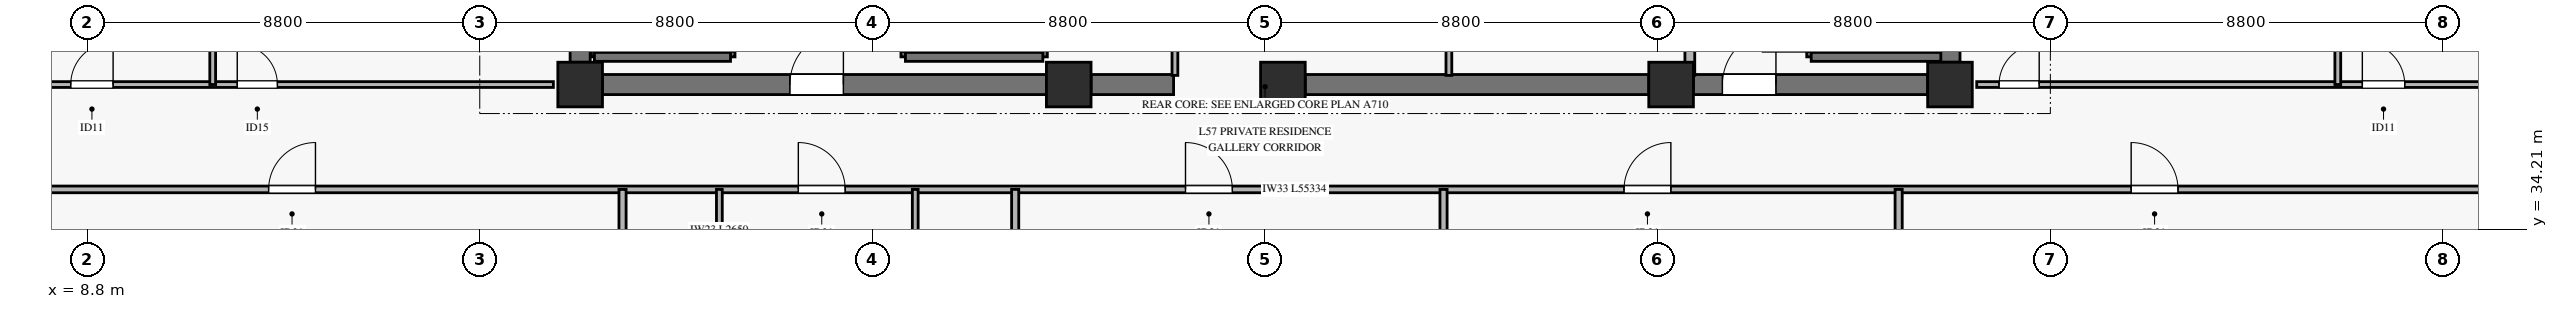
"""IFC4 building model, lengths in metres.
Left out: names, types, materials, properties, quantities, classifications, styles, units other than length and angle.
Written with IfcOpenShell. Run it as: python <this file> out.ifc"""

import sys

from ifc_helpers import new_model, si_unit, direction, frame, frame_2d, origin, origin_2d, place, context, subcontext, project, spatial, rectangle, extrude, source, transform, mapped, element, fill, save


model = new_model("IFC4")
c1 = context("Model", 3, precision=1e-05, world=origin(), true_north=direction((0.0, 1.0)))
c2 = subcontext(c1, "Body", "Model", "MODEL_VIEW")
j1 = project(units=[si_unit("LENGTHUNIT", "METRE"), si_unit("PLANEANGLEUNIT", "RADIAN")], contexts=[c1])
p1 = place(None, origin())
s1 = spatial("IfcSite", under=j1, at=p1, CompositionType="ELEMENT")
p2 = place(p1, origin())
s2 = spatial("IfcBuilding", under=s1, at=p2, CompositionType="ELEMENT")
p3 = place(p2, frame((0.0, 0.0, 227.0)))
s3 = spatial("IfcBuildingStorey", under=s2, at=p3, CompositionType="ELEMENT", Elevation=227.0)
m1 = source(origin(), c2, "Body", "SweptSolid", [
    extrude(rectangle(XDim=1.0, YDim=1.0, at=origin_2d()), origin(), (0.0, 0.0, 1.0), 3.185),
])
for number, where, z_axis, x_axis in (
    (1, (19.85, 37.45, 0.0), (0.0, 0.0, 1.0), (1.0, 0.0, 0.0)),
    (2, (30.8, 37.45, 0.0), (0.0, 0.0, 1.0), (1.0, 0.0, 0.0)),
    (3, (35.6, 37.45, 0.0), (0.0, 0.0, 1.0), (1.0, 0.0, 0.0)),
    (4, (44.3, 37.45, 0.0), (0.0, 0.0, 1.0), (1.0, 0.0, 0.0)),
    (5, (50.55, 37.45, 0.0), (0.0, 0.0, 1.0), (1.0, 0.0, 0.0)),
):
    element("IfcColumn", number, at=place(p3, frame(where, z_axis=z_axis, x_axis=x_axis)), inside=s3, PredefinedType="PILASTER", context=c2, shape_type="MappedRepresentation", body=[
        mapped(m1, transform((0.0, 0.0, 0.0), x_axis=(1.0, 0.0, 0.0), y_axis=(0.0, 1.0, 0.0), z_axis=(0.0, 0.0, 1.0), scale=1.0)),
    ])
p4 = place(p3, frame((20.35, 37.45, 0.0), z_axis=(0.0, 0.0, 1.0), x_axis=(1.0, 0.0, 0.0)))
e6 = element("IfcWall", 6, at=p4, inside=s3, PredefinedType="SHEAR", context=c2, shape_type="SweptSolid", body=[
    extrude(rectangle(XDim=9.95, YDim=0.45, at=frame_2d((4.975, 0.0))), origin(), (0.0, 0.0, 1.0), 3.185),
])
p5 = place(p4, frame((4.2, 0.0, 0.0)))
e7 = element("IfcOpeningElement", 7, at=p5, cuts=e6, PredefinedType="OPENING", context=c2, shape_type="SweptSolid", body=[
    extrude(rectangle(XDim=1.2, YDim=2.15, at=frame_2d((0.6, 1.075))), frame((0.0, 0.235, 0.0), z_axis=(0.0, -1.0, 0.0), x_axis=(1.0, 0.0, 0.0)), (0.0, 0.0, 1.0), 0.47),
])
p6 = place(p3, frame((31.3, 37.45, 0.0), z_axis=(0.0, 0.0, 1.0), x_axis=(1.0, 0.0, 0.0)))
e8 = element("IfcWall", 8, at=p6, inside=s3, PredefinedType="SHEAR", context=c2, shape_type="SweptSolid", body=[
    extrude(rectangle(XDim=1.85, YDim=0.45, at=frame_2d((0.925, 0.0))), origin(), (0.0, 0.0, 1.0), 3.185),
])
p7 = place(p3, frame((36.1, 37.45, 0.0), z_axis=(0.0, 0.0, 1.0), x_axis=(1.0, 0.0, 0.0)))
e9 = element("IfcWall", 9, at=p7, inside=s3, PredefinedType="SHEAR", context=c2, shape_type="SweptSolid", body=[
    extrude(rectangle(XDim=7.7, YDim=0.45, at=frame_2d((3.85, 0.0))), origin(), (0.0, 0.0, 1.0), 3.185),
])
p8 = place(p3, frame((44.8, 37.45, 0.0), z_axis=(0.0, 0.0, 1.0), x_axis=(1.0, 0.0, 0.0)))
e10 = element("IfcWall", 10, at=p8, inside=s3, PredefinedType="SHEAR", context=c2, shape_type="SweptSolid", body=[
    extrude(rectangle(XDim=5.25, YDim=0.45, at=frame_2d((2.625, 0.0))), origin(), (0.0, 0.0, 1.0), 3.185),
])
p9 = place(p8, frame((0.65, 0.0, 0.0)))
e11 = element("IfcOpeningElement", 11, at=p9, cuts=e10, PredefinedType="OPENING", context=c2, shape_type="SweptSolid", body=[
    extrude(rectangle(XDim=1.2, YDim=2.15, at=frame_2d((0.6, 1.075))), frame((0.0, 0.235, 0.0), z_axis=(0.0, -1.0, 0.0), x_axis=(1.0, 0.0, 0.0)), (0.0, 0.0, 1.0), 0.47),
])
for number, where, z_axis, x_axis in (
    (12, (19.85, 37.95, 0.0), (0.0, 0.0, 1.0), (0.0, 1.0, 0.0)),
    (13, (50.55, 37.95, 0.0), (0.0, 0.0, 1.0), (0.0, 1.0, 0.0)),
):
    element("IfcWall", number, at=place(p3, frame(where, z_axis=z_axis, x_axis=x_axis)), inside=s3, PredefinedType="SHEAR", context=c2, shape_type="SweptSolid", body=[
        extrude(rectangle(XDim=8.1, YDim=0.45, at=frame_2d((4.05, 0.0))), origin(), (0.0, 0.0, 1.0), 3.185),
    ])
p10 = place(p3, frame((20.17, 38.07, 0.0), z_axis=(0.0, 0.0, 1.0), x_axis=(0.0, 1.0, 0.0)))
e14 = element("IfcWall", 14, at=p10, inside=s3, PredefinedType="SOLIDWALL", context=c2, shape_type="SweptSolid", body=[
    extrude(rectangle(XDim=7.25, YDim=0.14, at=frame_2d((3.625, 0.0))), origin(), (0.0, 0.0, 1.0), 3.4),
])
p11 = place(p3, frame((23.22, 38.07, 0.0), z_axis=(0.0, 0.0, 1.0), x_axis=(0.0, 1.0, 0.0)))
e15 = element("IfcWall", 15, at=p11, inside=s3, PredefinedType="SOLIDWALL", context=c2, shape_type="SweptSolid", body=[
    extrude(rectangle(XDim=7.25, YDim=0.2, at=frame_2d((3.625, 0.0))), origin(), (0.0, 0.0, 1.0), 3.4),
])
p12 = place(p11, frame((0.11, 0.0, 0.0)))
e16 = element("IfcOpeningElement", 16, at=p12, cuts=e15, PredefinedType="OPENING", context=c2, shape_type="SweptSolid", body=[
    extrude(rectangle(XDim=1.1, YDim=2.15, at=frame_2d((0.55, 1.075))), frame((0.0, 0.11, 0.0), z_axis=(0.0, -1.0, 0.0), x_axis=(1.0, 0.0, 0.0)), (0.0, 0.0, 1.0), 0.22),
])
p13 = place(p3, frame((20.17, 38.07, 0.0), z_axis=(0.0, 0.0, 1.0), x_axis=(1.0, 0.0, 0.0)))
e17 = element("IfcWall", 17, at=p13, inside=s3, PredefinedType="SOLIDWALL", context=c2, shape_type="SweptSolid", body=[
    extrude(rectangle(XDim=3.05, YDim=0.2, at=frame_2d((1.525, 0.0))), origin(), (0.0, 0.0, 1.0), 3.4),
])
p14 = place(p3, frame((27.14, 38.07, 0.0), z_axis=(0.0, 0.0, 1.0), x_axis=(0.0, 1.0, 0.0)))
e18 = element("IfcWall", 18, at=p14, inside=s3, PredefinedType="SOLIDWALL", context=c2, shape_type="SweptSolid", body=[
    extrude(rectangle(XDim=7.25, YDim=0.2, at=frame_2d((3.625, 0.0))), origin(), (0.0, 0.0, 1.0), 3.4),
])
p15 = place(p14, frame((0.11, 0.0, 0.0)))
e19 = element("IfcOpeningElement", 19, at=p15, cuts=e18, PredefinedType="OPENING", context=c2, shape_type="SweptSolid", body=[
    extrude(rectangle(XDim=1.1, YDim=2.15, at=frame_2d((0.55, 1.075))), frame((0.0, 0.11, 0.0), z_axis=(0.0, -1.0, 0.0), x_axis=(1.0, 0.0, 0.0)), (0.0, 0.0, 1.0), 0.22),
])
p16 = place(p3, frame((30.22, 38.07, 0.0), z_axis=(0.0, 0.0, 1.0), x_axis=(0.0, 1.0, 0.0)))
e20 = element("IfcWall", 20, at=p16, inside=s3, PredefinedType="SOLIDWALL", context=c2, shape_type="SweptSolid", body=[
    extrude(rectangle(XDim=7.25, YDim=0.2, at=frame_2d((3.625, 0.0))), origin(), (0.0, 0.0, 1.0), 3.4),
])
p17 = place(p3, frame((27.14, 38.07, 0.0), z_axis=(0.0, 0.0, 1.0), x_axis=(1.0, 0.0, 0.0)))
e21 = element("IfcWall", 21, at=p17, inside=s3, PredefinedType="SOLIDWALL", context=c2, shape_type="SweptSolid", body=[
    extrude(rectangle(XDim=3.08, YDim=0.2, at=frame_2d((1.54, 0.0))), origin(), (0.0, 0.0, 1.0), 3.4),
])
p18 = place(p3, frame((47.44, 38.07, 0.0), z_axis=(0.0, 0.0, 1.0), x_axis=(0.0, 1.0, 0.0)))
e22 = element("IfcWall", 22, at=p18, inside=s3, PredefinedType="SOLIDWALL", context=c2, shape_type="SweptSolid", body=[
    extrude(rectangle(XDim=7.25, YDim=0.2, at=frame_2d((3.625, 0.0))), origin(), (0.0, 0.0, 1.0), 3.4),
])
p19 = place(p18, frame((0.11, 0.0, 0.0)))
e23 = element("IfcOpeningElement", 23, at=p19, cuts=e22, PredefinedType="OPENING", context=c2, shape_type="SweptSolid", body=[
    extrude(rectangle(XDim=1.1, YDim=2.15, at=frame_2d((0.55, 1.075))), frame((0.0, 0.11, 0.0), z_axis=(0.0, -1.0, 0.0), x_axis=(1.0, 0.0, 0.0)), (0.0, 0.0, 1.0), 0.22),
])
p20 = place(p3, frame((47.44, 38.07, 0.0), z_axis=(0.0, 0.0, 1.0), x_axis=(1.0, 0.0, 0.0)))
e24 = element("IfcWall", 24, at=p20, inside=s3, PredefinedType="SOLIDWALL", context=c2, shape_type="SweptSolid", body=[
    extrude(rectangle(XDim=2.905, YDim=0.2, at=frame_2d((1.453, 0.0))), origin(), (0.0, 0.0, 1.0), 3.4),
])
p21 = place(p3, frame((44.72, 37.655, 0.0), z_axis=(0.0, 0.0, 1.0), x_axis=(0.0, 1.0, 0.0)))
e25 = element("IfcWall", 25, at=p21, inside=s3, PredefinedType="SOLIDWALL", context=c2, shape_type="SweptSolid", body=[
    extrude(rectangle(XDim=7.565, YDim=0.22, at=frame_2d((3.782, 0.0))), origin(), (0.0, 0.0, 1.0), 3.185),
])
p22 = place(p3, frame((33.18, 37.655, 0.0), z_axis=(0.0, 0.0, 1.0), x_axis=(0.0, 1.0, 0.0)))
e26 = element("IfcWall", 26, at=p22, inside=s3, PredefinedType="PARTITIONING", context=c2, shape_type="SweptSolid", body=[
    extrude(rectangle(XDim=6.495, YDim=0.13, at=frame_2d((3.248, 0.0))), origin(), (0.0, 0.0, 1.0), 2.27),
])
p23 = place(p22, frame((2.245, 0.0, 0.0)))
e27 = element("IfcOpeningElement", 27, at=p23, cuts=e26, PredefinedType="OPENING", context=c2, shape_type="SweptSolid", body=[
    extrude(rectangle(XDim=0.9, YDim=2.1, at=frame_2d((0.45, 1.05))), frame((0.0, 0.075, 0.0), z_axis=(0.0, -1.0, 0.0), x_axis=(1.0, 0.0, 0.0)), (0.0, 0.0, 1.0), 0.15),
])
p24 = place(p3, frame((39.32, 37.655, 0.0), z_axis=(0.0, 0.0, 1.0), x_axis=(0.0, 1.0, 0.0)))
e28 = element("IfcWall", 28, at=p24, inside=s3, PredefinedType="PARTITIONING", context=c2, shape_type="SweptSolid", body=[
    extrude(rectangle(XDim=8.69, YDim=0.13, at=frame_2d((4.345, 0.0))), origin(), (0.0, 0.0, 1.0), 3.185),
])
p25 = place(p24, frame((4.865, 0.0, 0.0)))
e29 = element("IfcOpeningElement", 29, at=p25, cuts=e28, PredefinedType="OPENING", context=c2, shape_type="SweptSolid", body=[
    extrude(rectangle(XDim=0.9, YDim=2.1, at=frame_2d((0.45, 1.05))), frame((0.0, 0.075, 0.0), z_axis=(0.0, -1.0, 0.0), x_axis=(1.0, 0.0, 0.0)), (0.0, 0.0, 1.0), 0.15),
])
p26 = place(p3, frame((7.533, 35.1, 0.0), z_axis=(0.0, 0.0, 1.0), x_axis=(1.0, 0.0, 0.0)))
e30 = element("IfcWall", 30, at=p26, inside=s3, PredefinedType="PARTITIONING", context=c2, shape_type="SweptSolid", body=[
    extrude(rectangle(XDim=55.334, YDim=0.15, at=frame_2d((27.667, 0.0))), origin(), (0.0, 0.0, 1.0), 2.37),
])
p27 = place(p26, frame((5.335, 0.0, 0.0)))
e31 = element("IfcOpeningElement", 31, at=p27, cuts=e30, PredefinedType="OPENING", context=c2, shape_type="SweptSolid", body=[
    extrude(rectangle(XDim=1.05, YDim=2.15, at=frame_2d((0.525, 1.075))), frame((0.0, 0.085, 0.0), z_axis=(0.0, -1.0, 0.0), x_axis=(1.0, 0.0, 0.0)), (0.0, 0.0, 1.0), 0.17),
])
p28 = place(p26, frame((17.207, 0.0, 0.0)))
e32 = element("IfcOpeningElement", 32, at=p28, cuts=e30, PredefinedType="OPENING", context=c2, shape_type="SweptSolid", body=[
    extrude(rectangle(XDim=1.05, YDim=2.15, at=frame_2d((0.525, 1.075))), frame((0.0, 0.085, 0.0), z_axis=(0.0, -1.0, 0.0), x_axis=(1.0, 0.0, 0.0)), (0.0, 0.0, 1.0), 0.17),
])
p29 = place(p26, frame((25.884, 0.0, 0.0)))
e33 = element("IfcOpeningElement", 33, at=p29, cuts=e30, PredefinedType="OPENING", context=c2, shape_type="SweptSolid", body=[
    extrude(rectangle(XDim=1.05, YDim=2.15, at=frame_2d((0.525, 1.075))), frame((0.0, 0.085, 0.0), z_axis=(0.0, -1.0, 0.0), x_axis=(1.0, 0.0, 0.0)), (0.0, 0.0, 1.0), 0.17),
])
p30 = place(p26, frame((35.712, 0.0, 0.0)))
e34 = element("IfcOpeningElement", 34, at=p30, cuts=e30, PredefinedType="OPENING", context=c2, shape_type="SweptSolid", body=[
    extrude(rectangle(XDim=1.05, YDim=2.15, at=frame_2d((0.525, 1.075))), frame((0.0, 0.085, 0.0), z_axis=(0.0, -1.0, 0.0), x_axis=(1.0, 0.0, 0.0)), (0.0, 0.0, 1.0), 0.17),
])
p31 = place(p26, frame((47.078, 0.0, 0.0)))
e35 = element("IfcOpeningElement", 35, at=p31, cuts=e30, PredefinedType="OPENING", context=c2, shape_type="SweptSolid", body=[
    extrude(rectangle(XDim=1.05, YDim=2.15, at=frame_2d((0.525, 1.075))), frame((0.0, 0.085, 0.0), z_axis=(0.0, -1.0, 0.0), x_axis=(1.0, 0.0, 0.0)), (0.0, 0.0, 1.0), 0.17),
])
for number, where, z_axis, x_axis in (
    (36, (20.8, 13.25, 0.0), (0.0, 0.0, 1.0), (0.0, 1.0, 0.0)),
    (37, (29.6, 13.25, 0.0), (0.0, 0.0, 1.0), (0.0, 1.0, 0.0)),
    (38, (39.2, 13.25, 0.0), (0.0, 0.0, 1.0), (0.0, 1.0, 0.0)),
    (39, (49.4, 13.25, 0.0), (0.0, 0.0, 1.0), (0.0, 1.0, 0.0)),
):
    element("IfcWall", number, at=place(p3, frame(where, z_axis=z_axis, x_axis=x_axis)), inside=s3, PredefinedType="PARTITIONING", context=c2, shape_type="SweptSolid", body=[
        extrude(rectangle(XDim=21.85, YDim=0.16, at=frame_2d((10.925, 0.0))), origin(), (0.0, 0.0, 1.0), 2.77),
    ])
p32 = place(p3, frame((22.97, 32.45, 0.0), z_axis=(0.0, 0.0, 1.0), x_axis=(0.0, 1.0, 0.0)))
e40 = element("IfcWall", 40, at=p32, inside=s3, PredefinedType="PARTITIONING", context=c2, shape_type="SweptSolid", body=[
    extrude(rectangle(XDim=2.65, YDim=0.13, at=frame_2d((1.325, 0.0))), origin(), (0.0, 0.0, 1.0), 2.77),
])
p33 = place(p3, frame((27.36, 32.45, 0.0), z_axis=(0.0, 0.0, 1.0), x_axis=(0.0, 1.0, 0.0)))
e41 = element("IfcWall", 41, at=p33, inside=s3, PredefinedType="PARTITIONING", context=c2, shape_type="SweptSolid", body=[
    extrude(rectangle(XDim=2.65, YDim=0.13, at=frame_2d((1.325, 0.0))), origin(), (0.0, 0.0, 1.0), 2.77),
])
p34 = place(p33, frame((0.67, 0.0, 0.0)))
e42 = element("IfcOpeningElement", 42, at=p34, cuts=e41, PredefinedType="OPENING", context=c2, shape_type="SweptSolid", body=[
    extrude(rectangle(XDim=0.9, YDim=2.1, at=frame_2d((0.45, 1.05))), frame((0.0, 0.075, 0.0), z_axis=(0.0, -1.0, 0.0), x_axis=(1.0, 0.0, 0.0)), (0.0, 0.0, 1.0), 0.15),
])
p35 = place(p3, frame((7.533, 37.45, 0.0), z_axis=(0.0, 0.0, 1.0), x_axis=(1.0, 0.0, 0.0)))
e43 = element("IfcWall", 43, at=p35, inside=s3, PredefinedType="PARTITIONING", context=c2, shape_type="SweptSolid", body=[
    extrude(rectangle(XDim=11.717, YDim=0.13, at=frame_2d((5.858, 0.0))), origin(), (0.0, 0.0, 1.0), 2.82),
])
p36 = place(p35, frame((0.9, 0.0, 0.0)))
e44 = element("IfcOpeningElement", 44, at=p36, cuts=e43, PredefinedType="OPENING", context=c2, shape_type="SweptSolid", body=[
    extrude(rectangle(XDim=0.95, YDim=2.1, at=frame_2d((0.475, 1.05))), frame((0.0, 0.075, 0.0), z_axis=(0.0, -1.0, 0.0), x_axis=(1.0, 0.0, 0.0)), (0.0, 0.0, 1.0), 0.15),
])
p37 = place(p35, frame((4.632, 0.0, 0.0)))
e45 = element("IfcOpeningElement", 45, at=p37, cuts=e43, PredefinedType="OPENING", context=c2, shape_type="SweptSolid", body=[
    extrude(rectangle(XDim=0.9, YDim=2.1, at=frame_2d((0.45, 1.05))), frame((0.0, 0.075, 0.0), z_axis=(0.0, -1.0, 0.0), x_axis=(1.0, 0.0, 0.0)), (0.0, 0.0, 1.0), 0.15),
])
p38 = place(p3, frame((11.615, 37.45, 0.0), z_axis=(0.0, 0.0, 1.0), x_axis=(0.0, 1.0, 0.0)))
e46 = element("IfcWall", 46, at=p38, inside=s3, PredefinedType="PARTITIONING", context=c2, shape_type="SweptSolid", body=[
    extrude(rectangle(XDim=8.8, YDim=0.13, at=frame_2d((4.4, 0.0))), origin(), (0.0, 0.0, 1.0), 3.185),
])
p39 = place(p3, frame((51.15, 37.45, 0.0), z_axis=(0.0, 0.0, 1.0), x_axis=(1.0, 0.0, 0.0)))
e47 = element("IfcWall", 47, at=p39, inside=s3, PredefinedType="PARTITIONING", context=c2, shape_type="SweptSolid", body=[
    extrude(rectangle(XDim=11.717, YDim=0.13, at=frame_2d((5.858, 0.0))), origin(), (0.0, 0.0, 1.0), 2.82),
])
p40 = place(p39, frame((0.5, 0.0, 0.0)))
e48 = element("IfcOpeningElement", 48, at=p40, cuts=e47, PredefinedType="OPENING", context=c2, shape_type="SweptSolid", body=[
    extrude(rectangle(XDim=0.9, YDim=2.1, at=frame_2d((0.45, 1.05))), frame((0.0, 0.075, 0.0), z_axis=(0.0, -1.0, 0.0), x_axis=(1.0, 0.0, 0.0)), (0.0, 0.0, 1.0), 0.15),
])
p41 = place(p39, frame((8.642, 0.0, 0.0)))
e49 = element("IfcOpeningElement", 49, at=p41, cuts=e47, PredefinedType="OPENING", context=c2, shape_type="SweptSolid", body=[
    extrude(rectangle(XDim=0.95, YDim=2.1, at=frame_2d((0.475, 1.05))), frame((0.0, 0.075, 0.0), z_axis=(0.0, -1.0, 0.0), x_axis=(1.0, 0.0, 0.0)), (0.0, 0.0, 1.0), 0.15),
])
p42 = place(p3, frame((59.242, 37.45, 0.0), z_axis=(0.0, 0.0, 1.0), x_axis=(0.0, 1.0, 0.0)))
e50 = element("IfcWall", 50, at=p42, inside=s3, PredefinedType="PARTITIONING", context=c2, shape_type="SweptSolid", body=[
    extrude(rectangle(XDim=8.8, YDim=0.13, at=frame_2d((4.4, 0.0))), origin(), (0.0, 0.0, 1.0), 3.185),
])
m2 = source(origin(), c2, "Body", "SweptSolid", [
    extrude(rectangle(XDim=1.2, YDim=2.15, at=frame_2d((0.6, 1.075))), frame((0.0, 0.025, 0.0), z_axis=(0.0, -1.0, 0.0), x_axis=(1.0, 0.0, 0.0)), (0.0, 0.0, 1.0), 0.05),
])
p43 = place(p5, origin())
e51 = element("IfcDoor", 51, at=p43, inside=s3, OperationType="SINGLE_SWING_RIGHT", PredefinedType="DOOR", context=c2, shape_type="MappedRepresentation", body=[
    mapped(m2, transform((0.0, 0.0, 0.0), x_axis=(1.0, 0.0, 0.0), y_axis=(0.0, 1.0, 0.0), z_axis=(0.0, 0.0, 1.0), scale=1.0)),
])
fill(e7, e51)
p44 = place(p9, origin())
e52 = element("IfcDoor", 52, at=p44, inside=s3, OperationType="SINGLE_SWING_RIGHT", PredefinedType="DOOR", context=c2, shape_type="MappedRepresentation", body=[
    mapped(m2, transform((0.0, 0.0, 0.0), x_axis=(1.0, 0.0, 0.0), y_axis=(0.0, 1.0, 0.0), z_axis=(0.0, 0.0, 1.0), scale=1.0)),
])
fill(e11, e52)
m3 = source(origin(), c2, "Body", "SweptSolid", [
    extrude(rectangle(XDim=1.05, YDim=2.15, at=frame_2d((0.525, 1.075))), frame((0.0, 0.025, 0.0), z_axis=(0.0, -1.0, 0.0), x_axis=(1.0, 0.0, 0.0)), (0.0, 0.0, 1.0), 0.05),
])
p45 = place(p27, origin())
e53 = element("IfcDoor", 53, at=p45, inside=s3, OperationType="SINGLE_SWING_RIGHT", PredefinedType="DOOR", context=c2, shape_type="MappedRepresentation", body=[
    mapped(m3, transform((0.0, 0.0, 0.0), x_axis=(1.0, 0.0, 0.0), y_axis=(0.0, 1.0, 0.0), z_axis=(0.0, 0.0, 1.0), scale=1.0)),
])
fill(e31, e53)
p46 = place(p28, origin())
e54 = element("IfcDoor", 54, at=p46, inside=s3, OperationType="SINGLE_SWING_LEFT", PredefinedType="DOOR", context=c2, shape_type="MappedRepresentation", body=[
    mapped(m3, transform((0.0, 0.0, 0.0), x_axis=(1.0, 0.0, 0.0), y_axis=(0.0, 1.0, 0.0), z_axis=(0.0, 0.0, 1.0), scale=1.0)),
])
fill(e32, e54)
p47 = place(p29, origin())
e55 = element("IfcDoor", 55, at=p47, inside=s3, OperationType="SINGLE_SWING_LEFT", PredefinedType="DOOR", context=c2, shape_type="MappedRepresentation", body=[
    mapped(m3, transform((0.0, 0.0, 0.0), x_axis=(1.0, 0.0, 0.0), y_axis=(0.0, 1.0, 0.0), z_axis=(0.0, 0.0, 1.0), scale=1.0)),
])
fill(e33, e55)
p48 = place(p30, origin())
e56 = element("IfcDoor", 56, at=p48, inside=s3, OperationType="SINGLE_SWING_RIGHT", PredefinedType="DOOR", context=c2, shape_type="MappedRepresentation", body=[
    mapped(m3, transform((0.0, 0.0, 0.0), x_axis=(1.0, 0.0, 0.0), y_axis=(0.0, 1.0, 0.0), z_axis=(0.0, 0.0, 1.0), scale=1.0)),
])
fill(e34, e56)
p49 = place(p31, origin())
e57 = element("IfcDoor", 57, at=p49, inside=s3, OperationType="SINGLE_SWING_LEFT", PredefinedType="DOOR", context=c2, shape_type="MappedRepresentation", body=[
    mapped(m3, transform((0.0, 0.0, 0.0), x_axis=(1.0, 0.0, 0.0), y_axis=(0.0, 1.0, 0.0), z_axis=(0.0, 0.0, 1.0), scale=1.0)),
])
fill(e35, e57)
m4 = source(origin(), c2, "Body", "SweptSolid", [
    extrude(rectangle(XDim=0.95, YDim=2.1, at=frame_2d((0.475, 1.05))), frame((0.0, 0.025, 0.0), z_axis=(0.0, -1.0, 0.0), x_axis=(1.0, 0.0, 0.0)), (0.0, 0.0, 1.0), 0.05),
])
p50 = place(p36, origin())
e58 = element("IfcDoor", 58, at=p50, inside=s3, OperationType="SINGLE_SWING_RIGHT", PredefinedType="DOOR", context=c2, shape_type="MappedRepresentation", body=[
    mapped(m4, transform((0.0, 0.0, 0.0), x_axis=(1.0, 0.0, 0.0), y_axis=(0.0, 1.0, 0.0), z_axis=(0.0, 0.0, 1.0), scale=1.0)),
])
fill(e44, e58)
m5 = source(origin(), c2, "Body", "SweptSolid", [
    extrude(rectangle(XDim=0.9, YDim=2.1, at=frame_2d((0.45, 1.05))), frame((0.0, 0.025, 0.0), z_axis=(0.0, -1.0, 0.0), x_axis=(1.0, 0.0, 0.0)), (0.0, 0.0, 1.0), 0.05),
])
p51 = place(p37, origin())
e59 = element("IfcDoor", 59, at=p51, inside=s3, OperationType="SINGLE_SWING_LEFT", PredefinedType="DOOR", context=c2, shape_type="MappedRepresentation", body=[
    mapped(m5, transform((0.0, 0.0, 0.0), x_axis=(1.0, 0.0, 0.0), y_axis=(0.0, 1.0, 0.0), z_axis=(0.0, 0.0, 1.0), scale=1.0)),
])
fill(e45, e59)
p52 = place(p40, origin())
e60 = element("IfcDoor", 60, at=p52, inside=s3, OperationType="SINGLE_SWING_RIGHT", PredefinedType="DOOR", context=c2, shape_type="MappedRepresentation", body=[
    mapped(m5, transform((0.0, 0.0, 0.0), x_axis=(1.0, 0.0, 0.0), y_axis=(0.0, 1.0, 0.0), z_axis=(0.0, 0.0, 1.0), scale=1.0)),
])
fill(e48, e60)
p53 = place(p41, origin())
e61 = element("IfcDoor", 61, at=p53, inside=s3, OperationType="SINGLE_SWING_LEFT", PredefinedType="DOOR", context=c2, shape_type="MappedRepresentation", body=[
    mapped(m4, transform((0.0, 0.0, 0.0), x_axis=(1.0, 0.0, 0.0), y_axis=(0.0, 1.0, 0.0), z_axis=(0.0, 0.0, 1.0), scale=1.0)),
])
fill(e49, e61)
save(model, sys.argv[1])
